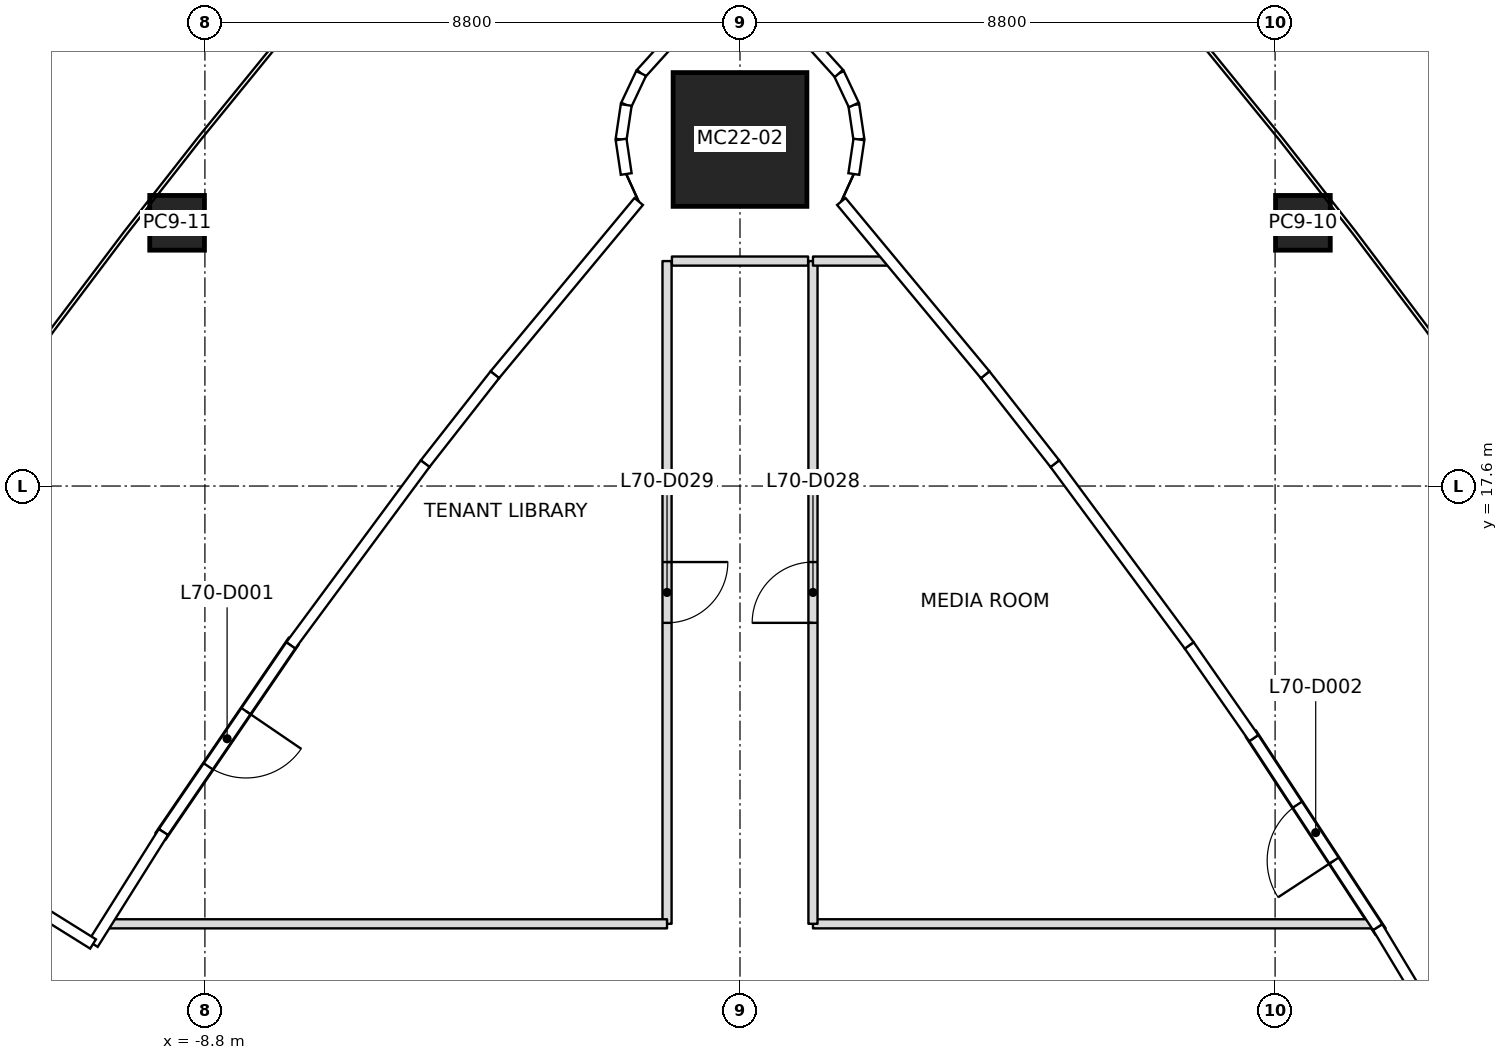
"""IFC4 building model, lengths in metres.
Left out: names, types, materials, properties, quantities, classifications, styles, units other than length and angle.
Written with IfcOpenShell. Run it as: python <this file> out.ifc"""

import sys

from ifc_helpers import new_model, si_unit, direction, frame, frame_2d, origin, origin_2d, place, context, subcontext, project, spatial, rectangle, extrude, element, fill, save


model = new_model("IFC4")
c1 = context("Model", 3, precision=1e-05, world=origin(), true_north=direction((0.0, 1.0)))
c2 = subcontext(c1, "Body", "Model", "MODEL_VIEW")
j1 = project(units=[si_unit("LENGTHUNIT", "METRE"), si_unit("PLANEANGLEUNIT", "RADIAN")], contexts=[c1])
p1 = place(None, origin())
s1 = spatial("IfcSite", under=j1, at=p1, CompositionType="ELEMENT")
p2 = place(p1, origin())
s2 = spatial("IfcBuilding", under=s1, at=p2, CompositionType="ELEMENT")
p3 = place(p2, frame((0.0, 0.0, 307.0)))
s3 = spatial("IfcBuildingStorey", under=s2, at=p3, CompositionType="ELEMENT", Elevation=307.0)
p4 = place(p3, frame((0.0, 23.3, 0.0), z_axis=(0.0, -0.031966077398, 0.999488954364), x_axis=(1.0, 0.0, 0.0)))
e1 = element("IfcColumn", 1, at=p4, inside=s3, PredefinedType="COLUMN", context=c2, shape_type="SweptSolid", body=[
    extrude(rectangle(XDim=2.2, YDim=2.2, at=origin_2d()), origin(), (0.0, 0.0, 1.0), 4.002),
])
for number, where, z_axis, x_axis in (
    (2, (9.257, 21.929, 0.0), (-0.0, -0.02, 1.0), (-0.614, 0.789, 0.016)),
    (3, (-9.257, 21.929, 0.0), (0.0, -0.02, 1.0), (0.614, 0.789, 0.016)),
):
    element("IfcColumn", number, at=place(p3, frame(where, z_axis=z_axis, x_axis=x_axis)), inside=s3, PredefinedType="COLUMN", context=c2, shape_type="SweptSolid", body=[
        extrude(rectangle(XDim=0.9, YDim=0.9, at=origin_2d()), origin(), (0.0, 0.0, 1.0), 4.001),
    ])
p5 = place(p3, frame((10.536, 10.27, 0.0), z_axis=(0.0, 0.0, 1.0), x_axis=(-0.548045908614, 0.836448254258, 0.0)))
e4 = element("IfcWall", 4, at=p5, inside=s3, PredefinedType="SOLIDWALL", context=c2, shape_type="SweptSolid", body=[
    extrude(rectangle(XDim=3.896, YDim=0.2, at=frame_2d((1.948, 0.0))), origin(), (0.0, 0.0, 1.0), 3.34),
])
p6 = place(p5, frame((1.398, 0.0, 0.0)))
e5 = element("IfcOpeningElement", 5, at=p6, cuts=e4, PredefinedType="OPENING", context=c2, shape_type="SweptSolid", body=[
    extrude(rectangle(XDim=1.1, YDim=2.1, at=frame_2d((0.55, 1.05))), frame((0.0, 0.1, 0.0), z_axis=(0.0, -1.0, 0.0), x_axis=(1.0, 0.0, 0.0)), (0.0, 0.0, 1.0), 0.2),
])
p7 = place(p3, frame((-7.337, 15.053, 0.0), z_axis=(0.0, 0.0, 1.0), x_axis=(-0.563704213483, -0.825976730726, 0.0)))
e6 = element("IfcWall", 6, at=p7, inside=s3, PredefinedType="SOLIDWALL", context=c2, shape_type="SweptSolid", body=[
    extrude(rectangle(XDim=3.896, YDim=0.2, at=frame_2d((1.948, 0.0))), origin(), (0.0, 0.0, 1.0), 3.317),
])
p8 = place(p7, frame((1.398, 0.0, 0.0)))
e7 = element("IfcOpeningElement", 7, at=p8, cuts=e6, PredefinedType="OPENING", context=c2, shape_type="SweptSolid", body=[
    extrude(rectangle(XDim=1.1, YDim=2.1, at=frame_2d((0.55, 1.05))), frame((0.0, 0.1, 0.0), z_axis=(0.0, -1.0, 0.0), x_axis=(1.0, 0.0, 0.0)), (0.0, 0.0, 1.0), 0.2),
])
p9 = place(p3, frame((1.2, 21.3, 0.0), z_axis=(0.0, 0.0, 1.0), x_axis=(1.0, 0.0, 0.0)))
e8 = element("IfcWall", 8, at=p9, inside=s3, PredefinedType="PARTITIONING", context=c2, shape_type="SweptSolid", body=[
    extrude(rectangle(XDim=1.296, YDim=0.15, at=frame_2d((0.648, 0.0))), origin(), (0.0, 0.0, 1.0), 3.45),
])
p10 = place(p3, frame((-1.2, 21.3, 0.0), z_axis=(0.0, 0.0, 1.0), x_axis=(0.0, -1.0, 0.0)))
e9 = element("IfcWall", 9, at=p10, inside=s3, PredefinedType="PARTITIONING", context=c2, shape_type="SweptSolid", body=[
    extrude(rectangle(XDim=10.9, YDim=0.15, at=frame_2d((5.45, 0.0))), origin(), (0.0, 0.0, 1.0), 3.317),
])
p11 = place(p10, frame((4.95, 0.0, 0.0)))
e10 = element("IfcOpeningElement", 10, at=p11, cuts=e9, PredefinedType="OPENING", context=c2, shape_type="SweptSolid", body=[
    extrude(rectangle(XDim=1.0, YDim=2.1, at=frame_2d((0.5, 1.05))), frame((0.0, 0.075, 0.0), z_axis=(0.0, -1.0, 0.0), x_axis=(1.0, 0.0, 0.0)), (0.0, 0.0, 1.0), 0.15),
])
p12 = place(p3, frame((-1.2, 10.4, 0.0), z_axis=(0.0, 0.0, 1.0), x_axis=(-1.0, 0.0, 0.0)))
e11 = element("IfcWall", 11, at=p12, inside=s3, PredefinedType="PARTITIONING", context=c2, shape_type="SweptSolid", body=[
    extrude(rectangle(XDim=9.251, YDim=0.15, at=frame_2d((4.625, 0.0))), origin(), (0.0, 0.0, 1.0), 3.45),
])
p13 = place(p3, frame((1.12, 21.3, 0.0), z_axis=(0.0, 0.0, 1.0), x_axis=(-1.0, 0.0, 0.0)))
e12 = element("IfcWall", 12, at=p13, inside=s3, PredefinedType="PARTITIONING", context=c2, shape_type="SweptSolid", body=[
    extrude(rectangle(XDim=2.24, YDim=0.15, at=frame_2d((1.12, 0.0))), origin(), (0.0, 0.0, 1.0), 3.233),
])
p14 = place(p3, frame((10.451, 10.4, 0.0), z_axis=(0.0, 0.0, 1.0), x_axis=(-1.0, 0.0, 0.0)))
e13 = element("IfcWall", 13, at=p14, inside=s3, PredefinedType="PARTITIONING", context=c2, shape_type="SweptSolid", body=[
    extrude(rectangle(XDim=9.251, YDim=0.15, at=frame_2d((4.625, 0.0))), origin(), (0.0, 0.0, 1.0), 3.45),
])
p15 = place(p3, frame((1.2, 10.4, 0.0), z_axis=(0.0, 0.0, 1.0), x_axis=(0.0, 1.0, 0.0)))
e14 = element("IfcWall", 14, at=p15, inside=s3, PredefinedType="PARTITIONING", context=c2, shape_type="SweptSolid", body=[
    extrude(rectangle(XDim=10.9, YDim=0.15, at=frame_2d((5.45, 0.0))), origin(), (0.0, 0.0, 1.0), 3.317),
])
p16 = place(p15, frame((4.95, 0.0, 0.0)))
e15 = element("IfcOpeningElement", 15, at=p16, cuts=e14, PredefinedType="OPENING", context=c2, shape_type="SweptSolid", body=[
    extrude(rectangle(XDim=1.0, YDim=2.1, at=frame_2d((0.5, 1.05))), frame((0.0, 0.075, 0.0), z_axis=(0.0, -1.0, 0.0), x_axis=(1.0, 0.0, 0.0)), (0.0, 0.0, 1.0), 0.15),
])
p17 = place(p6, origin())
e16 = element("IfcDoor", 16, at=p17, inside=s3, OperationType="SINGLE_SWING_RIGHT", PredefinedType="DOOR", context=c2, shape_type="SweptSolid", body=[
    extrude(rectangle(XDim=1.1, YDim=2.1, at=frame_2d((0.55, 1.05))), frame((0.0, 0.025, 0.0), z_axis=(0.0, -1.0, 0.0), x_axis=(1.0, 0.0, 0.0)), (0.0, 0.0, 1.0), 0.05),
])
fill(e5, e16)
p18 = place(p8, origin())
e17 = element("IfcDoor", 17, at=p18, inside=s3, OperationType="SINGLE_SWING_RIGHT", PredefinedType="DOOR", context=c2, shape_type="SweptSolid", body=[
    extrude(rectangle(XDim=1.1, YDim=2.1, at=frame_2d((0.55, 1.05))), frame((0.0, 0.025, 0.0), z_axis=(0.0, -1.0, 0.0), x_axis=(1.0, 0.0, 0.0)), (0.0, 0.0, 1.0), 0.05),
])
fill(e7, e17)
p19 = place(p16, origin())
e18 = element("IfcDoor", 18, at=p19, inside=s3, OperationType="SINGLE_SWING_RIGHT", PredefinedType="DOOR", context=c2, shape_type="SweptSolid", body=[
    extrude(rectangle(XDim=1.0, YDim=2.1, at=frame_2d((0.5, 1.05))), frame((0.0, 0.025, 0.0), z_axis=(0.0, -1.0, 0.0), x_axis=(1.0, 0.0, 0.0)), (0.0, 0.0, 1.0), 0.05),
])
fill(e15, e18)
p20 = place(p11, origin())
e19 = element("IfcDoor", 19, at=p20, inside=s3, OperationType="SINGLE_SWING_LEFT", PredefinedType="DOOR", context=c2, shape_type="SweptSolid", body=[
    extrude(rectangle(XDim=1.0, YDim=2.1, at=frame_2d((0.5, 1.05))), frame((0.0, 0.025, 0.0), z_axis=(0.0, -1.0, 0.0), x_axis=(1.0, 0.0, 0.0)), (0.0, 0.0, 1.0), 0.05),
])
fill(e10, e19)
save(model, sys.argv[1])
